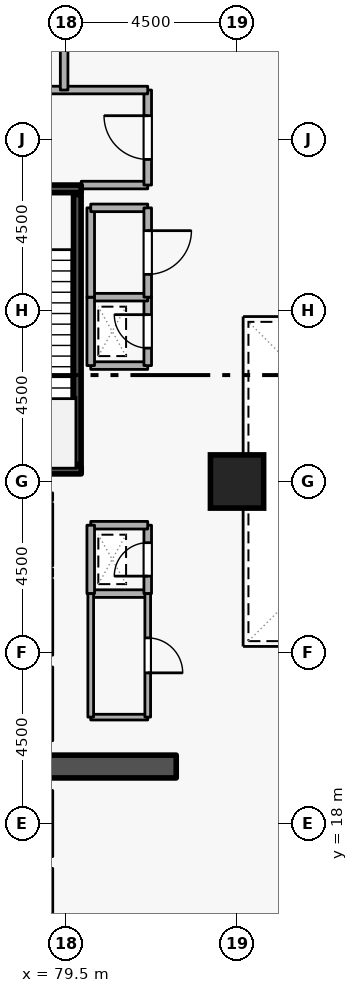
"""IFC4 building model, lengths in metres.
Left out: names, types, materials, properties, quantities, classifications, styles, units other than length and angle.
Written with IfcOpenShell. Run it as: python <this file> out.ifc"""

import sys

from ifc_helpers import new_model, si_unit, direction, frame, frame_2d, origin, origin_2d, place, context, subcontext, project, spatial, rectangle, extrude, element, fill, save


model = new_model("IFC4")
c1 = context("Model", 3, precision=1e-05, world=origin(), true_north=direction((0.0, 1.0)))
c2 = subcontext(c1, "Body", "Model", "MODEL_VIEW")
j1 = project(units=[si_unit("LENGTHUNIT", "METRE"), si_unit("PLANEANGLEUNIT", "RADIAN")], contexts=[c1])
p1 = place(None, origin())
s1 = spatial("IfcSite", under=j1, at=p1, CompositionType="ELEMENT")
p2 = place(p1, origin())
s2 = spatial("IfcBuilding", under=s1, at=p2, CompositionType="ELEMENT")
p3 = place(p2, origin())
s3 = spatial("IfcBuildingStorey", under=s2, at=p3, CompositionType="ELEMENT", Elevation=0.0)
p4 = place(p3, frame((76.7, 19.5, 0.0), z_axis=(0.0, 0.0, 1.0), x_axis=(1.0, 0.0, 0.0)))
e1 = element("IfcWall", 1, at=p4, inside=s3, PredefinedType="SHEAR", context=c2, shape_type="SweptSolid", body=[
    extrude(rectangle(XDim=5.7, YDim=0.6, at=frame_2d((2.85, 0.0))), origin(), (0.0, 0.0, 1.0), 4.8),
])
p5 = place(p3, frame((84.0, 27.0, 0.0), z_axis=(0.0, 0.0, 1.0), x_axis=(1.0, 0.0, 0.0)))
e2 = element("IfcColumn", 2, at=p5, inside=s3, PredefinedType="COLUMN", context=c2, shape_type="SweptSolid", body=[
    extrude(rectangle(XDim=1.4, YDim=1.4, at=origin_2d()), origin(), (0.0, 0.0, 1.0), 4.8),
])
p6 = place(p3, frame((79.05, 24.78, 0.0), z_axis=(0.0, 0.0, 1.0), x_axis=(0.0, 1.0, 0.0)))
e3 = element("IfcWall", 3, at=p6, inside=s3, PredefinedType="STANDARD", context=c2, shape_type="SweptSolid", body=[
    extrude(rectangle(XDim=1.64, YDim=0.2, at=frame_2d((0.82, 0.0))), origin(), (0.0, 0.0, 1.0), 4.46),
])
p7 = place(p6, frame((0.31, 0.0, 0.0)))
e4 = element("IfcOpeningElement", 4, at=p7, cuts=e3, PredefinedType="OPENING", context=c2, shape_type="SweptSolid", body=[
    extrude(rectangle(XDim=1.02, YDim=2.06, at=frame_2d((0.51, 1.03))), frame((0.0, 0.11, 0.0), z_axis=(0.0, -1.0, 0.0), x_axis=(1.0, 0.0, 0.0)), (0.0, 0.0, 1.0), 0.22),
])
p8 = place(p3, frame((79.05, 22.43, 0.0), z_axis=(0.0, 0.0, 1.0), x_axis=(0.0, 1.0, 0.0)))
e5 = element("IfcWall", 5, at=p8, inside=s3, PredefinedType="STANDARD", context=c2, shape_type="SweptSolid", body=[
    extrude(rectangle(XDim=1.99, YDim=0.2, at=frame_2d((0.995, 0.0))), origin(), (0.0, 0.0, 1.0), 4.46),
])
p9 = place(p8, frame((0.485, 0.0, 0.0)))
e6 = element("IfcOpeningElement", 6, at=p9, cuts=e5, PredefinedType="OPENING", context=c2, shape_type="SweptSolid", body=[
    extrude(rectangle(XDim=1.02, YDim=2.06, at=frame_2d((0.51, 1.03))), frame((0.0, 0.11, 0.0), z_axis=(0.0, -1.0, 0.0), x_axis=(1.0, 0.0, 0.0)), (0.0, 0.0, 1.0), 0.22),
])
p10 = place(p3, frame((79.05, 20.18, 0.0), z_axis=(0.0, 0.0, 1.0), x_axis=(0.0, 1.0, 0.0)))
e7 = element("IfcWall", 7, at=p10, inside=s3, PredefinedType="STANDARD", context=c2, shape_type="SweptSolid", body=[
    extrude(rectangle(XDim=1.94, YDim=0.2, at=frame_2d((0.97, 0.0))), origin(), (0.0, 0.0, 1.0), 4.46),
])
p11 = place(p10, frame((0.46, 0.0, 0.0)))
e8 = element("IfcOpeningElement", 8, at=p11, cuts=e7, PredefinedType="OPENING", context=c2, shape_type="SweptSolid", body=[
    extrude(rectangle(XDim=1.02, YDim=2.06, at=frame_2d((0.51, 1.03))), frame((0.0, 0.11, 0.0), z_axis=(0.0, -1.0, 0.0), x_axis=(1.0, 0.0, 0.0)), (0.0, 0.0, 1.0), 0.22),
])
p12 = place(p3, frame((79.05, 17.13, 0.0), z_axis=(0.0, 0.0, 1.0), x_axis=(0.0, 1.0, 0.0)))
e9 = element("IfcWall", 9, at=p12, inside=s3, PredefinedType="STANDARD", context=c2, shape_type="SweptSolid", body=[
    extrude(rectangle(XDim=1.74, YDim=0.2, at=frame_2d((0.87, 0.0))), origin(), (0.0, 0.0, 1.0), 4.46),
])
p13 = place(p12, frame((0.36, 0.0, 0.0)))
e10 = element("IfcOpeningElement", 10, at=p13, cuts=e9, PredefinedType="OPENING", context=c2, shape_type="SweptSolid", body=[
    extrude(rectangle(XDim=1.02, YDim=2.06, at=frame_2d((0.51, 1.03))), frame((0.0, 0.11, 0.0), z_axis=(0.0, -1.0, 0.0), x_axis=(1.0, 0.0, 0.0)), (0.0, 0.0, 1.0), 0.22),
])
p14 = place(p3, frame((79.05, 15.03, 0.0), z_axis=(0.0, 0.0, 1.0), x_axis=(0.0, 1.0, 0.0)))
e11 = element("IfcWall", 11, at=p14, inside=s3, PredefinedType="STANDARD", context=c2, shape_type="SweptSolid", body=[
    extrude(rectangle(XDim=1.79, YDim=0.2, at=frame_2d((0.895, 0.0))), origin(), (0.0, 0.0, 1.0), 4.46),
])
p15 = place(p14, frame((0.385, 0.0, 0.0)))
e12 = element("IfcOpeningElement", 12, at=p15, cuts=e11, PredefinedType="OPENING", context=c2, shape_type="SweptSolid", body=[
    extrude(rectangle(XDim=1.02, YDim=2.06, at=frame_2d((0.51, 1.03))), frame((0.0, 0.11, 0.0), z_axis=(0.0, -1.0, 0.0), x_axis=(1.0, 0.0, 0.0)), (0.0, 0.0, 1.0), 0.22),
])
p16 = place(p3, frame((76.55, 34.7, 0.0), z_axis=(0.0, 0.0, 1.0), x_axis=(1.0, 0.0, 0.0)))
e13 = element("IfcWall", 13, at=p16, inside=s3, PredefinedType="SHEAR", context=c2, shape_type="SweptSolid", body=[
    extrude(rectangle(XDim=3.35, YDim=0.2, at=frame_2d((1.675, 0.0))), origin(), (0.0, 0.0, 1.0), 4.8),
])
p17 = place(p16, frame((1.125, 0.0, 0.0)))
e14 = element("IfcOpeningElement", 14, at=p17, cuts=e13, PredefinedType="OPENING", context=c2, shape_type="SweptSolid", body=[
    extrude(rectangle(XDim=1.1, YDim=2.1, at=frame_2d((0.55, 1.05))), frame((0.0, 0.11, 0.0), z_axis=(0.0, -1.0, 0.0), x_axis=(1.0, 0.0, 0.0)), (0.0, 0.0, 1.0), 0.22),
])
p18 = place(p3, frame((79.9, 27.3, 0.0), z_axis=(0.0, 0.0, 1.0), x_axis=(-1.0, 0.0, 0.0)))
e15 = element("IfcWall", 15, at=p18, inside=s3, PredefinedType="SHEAR", context=c2, shape_type="SweptSolid", body=[
    extrude(rectangle(XDim=3.35, YDim=0.2, at=frame_2d((1.675, 0.0))), origin(), (0.0, 0.0, 1.0), 4.8),
])
p19 = place(p3, frame((79.797, 27.45, 0.0), z_axis=(0.0, 0.0, 1.0), x_axis=(0.0, 1.0, 0.0)))
e16 = element("IfcWall", 16, at=p19, inside=s3, PredefinedType="SHEAR", context=c2, shape_type="SweptSolid", body=[
    extrude(rectangle(XDim=7.1, YDim=0.2, at=frame_2d((3.55, 0.0))), origin(), (0.0, 0.0, 1.0), 4.8),
])
p20 = place(p3, frame((79.9, 34.8, 0.0), z_axis=(0.0, 0.0, 1.0), x_axis=(1.0, 0.0, 0.0)))
e17 = element("IfcWall", 17, at=p20, inside=s3, PredefinedType="STANDARD", context=c2, shape_type="SweptSolid", body=[
    extrude(rectangle(XDim=1.75, YDim=0.2, at=frame_2d((0.875, 0.0))), origin(), (0.0, 0.0, 1.0), 3.665),
])
p21 = place(p3, frame((81.65, 34.8, 0.0), z_axis=(0.0, 0.0, 1.0), x_axis=(0.0, 1.0, 0.0)))
e18 = element("IfcWall", 18, at=p21, inside=s3, PredefinedType="STANDARD", context=c2, shape_type="SweptSolid", body=[
    extrude(rectangle(XDim=2.5, YDim=0.2, at=frame_2d((1.25, 0.0))), origin(), (0.0, 0.0, 1.0), 4.46),
])
p22 = place(p21, frame((0.675, 0.0, 0.0)))
e19 = element("IfcOpeningElement", 19, at=p22, cuts=e18, PredefinedType="OPENING", context=c2, shape_type="SweptSolid", body=[
    extrude(rectangle(XDim=1.15, YDim=2.1, at=frame_2d((0.575, 1.05))), frame((0.0, 0.11, 0.0), z_axis=(0.0, -1.0, 0.0), x_axis=(1.0, 0.0, 0.0)), (0.0, 0.0, 1.0), 0.22),
])
p23 = place(p3, frame((81.65, 37.3, 0.0), z_axis=(0.0, 0.0, 1.0), x_axis=(-1.0, 0.0, 0.0)))
e20 = element("IfcWall", 20, at=p23, inside=s3, PredefinedType="STANDARD", context=c2, shape_type="SweptSolid", body=[
    extrude(rectangle(XDim=5.15, YDim=0.2, at=frame_2d((2.575, 0.0))), origin(), (0.0, 0.0, 1.0), 4.46),
])
p24 = place(p23, frame((2.75, 0.0, 0.0)))
e21 = element("IfcOpeningElement", 21, at=p24, cuts=e20, PredefinedType="OPENING", context=c2, shape_type="SweptSolid", body=[
    extrude(rectangle(XDim=1.15, YDim=2.1, at=frame_2d((0.575, 1.05))), frame((0.0, 0.11, 0.0), z_axis=(0.0, -1.0, 0.0), x_axis=(1.0, 0.0, 0.0)), (0.0, 0.0, 1.0), 0.22),
])
p25 = place(p3, frame((80.15, 24.05, 0.0), z_axis=(0.0, 0.0, 1.0), x_axis=(1.0, 0.0, 0.0)))
e22 = element("IfcWall", 22, at=p25, inside=s3, PredefinedType="STANDARD", context=c2, shape_type="SweptSolid", body=[
    extrude(rectangle(XDim=1.5, YDim=0.2, at=frame_2d((0.75, 0.0))), origin(), (0.0, 0.0, 1.0), 4.46),
])
p26 = place(p3, frame((81.65, 24.05, 0.0), z_axis=(0.0, 0.0, 1.0), x_axis=(0.0, 1.0, 0.0)))
e23 = element("IfcWall", 23, at=p26, inside=s3, PredefinedType="STANDARD", context=c2, shape_type="SweptSolid", body=[
    extrude(rectangle(XDim=1.8, YDim=0.2, at=frame_2d((0.9, 0.0))), origin(), (0.0, 0.0, 1.0), 4.46),
])
p27 = place(p26, frame((0.46, 0.0, 0.0)))
e24 = element("IfcOpeningElement", 24, at=p27, cuts=e23, PredefinedType="OPENING", context=c2, shape_type="SweptSolid", body=[
    extrude(rectangle(XDim=0.88, YDim=2.04, at=frame_2d((0.44, 1.02))), frame((0.0, 0.11, 0.0), z_axis=(0.0, -1.0, 0.0), x_axis=(1.0, 0.0, 0.0)), (0.0, 0.0, 1.0), 0.22),
])
p28 = place(p3, frame((81.65, 25.85, 0.0), z_axis=(0.0, 0.0, 1.0), x_axis=(-1.0, 0.0, 0.0)))
e25 = element("IfcWall", 25, at=p28, inside=s3, PredefinedType="STANDARD", context=c2, shape_type="SweptSolid", body=[
    extrude(rectangle(XDim=1.5, YDim=0.2, at=frame_2d((0.75, 0.0))), origin(), (0.0, 0.0, 1.0), 4.46),
])
p29 = place(p3, frame((80.15, 25.85, 0.0), z_axis=(0.0, 0.0, 1.0), x_axis=(0.0, -1.0, 0.0)))
e26 = element("IfcWall", 26, at=p29, inside=s3, PredefinedType="STANDARD", context=c2, shape_type="SweptSolid", body=[
    extrude(rectangle(XDim=1.8, YDim=0.2, at=frame_2d((0.9, 0.0))), origin(), (0.0, 0.0, 1.0), 4.46),
])
p30 = place(p3, frame((80.15, 30.05, 0.0), z_axis=(0.0, 0.0, 1.0), x_axis=(1.0, 0.0, 0.0)))
e27 = element("IfcWall", 27, at=p30, inside=s3, PredefinedType="STANDARD", context=c2, shape_type="SweptSolid", body=[
    extrude(rectangle(XDim=1.5, YDim=0.2, at=frame_2d((0.75, 0.0))), origin(), (0.0, 0.0, 1.0), 4.46),
])
p31 = place(p3, frame((81.65, 30.05, 0.0), z_axis=(0.0, 0.0, 1.0), x_axis=(0.0, 1.0, 0.0)))
e28 = element("IfcWall", 28, at=p31, inside=s3, PredefinedType="STANDARD", context=c2, shape_type="SweptSolid", body=[
    extrude(rectangle(XDim=1.8, YDim=0.2, at=frame_2d((0.9, 0.0))), origin(), (0.0, 0.0, 1.0), 4.46),
])
p32 = place(p31, frame((0.46, 0.0, 0.0)))
e29 = element("IfcOpeningElement", 29, at=p32, cuts=e28, PredefinedType="OPENING", context=c2, shape_type="SweptSolid", body=[
    extrude(rectangle(XDim=0.88, YDim=2.04, at=frame_2d((0.44, 1.02))), frame((0.0, 0.11, 0.0), z_axis=(0.0, -1.0, 0.0), x_axis=(1.0, 0.0, 0.0)), (0.0, 0.0, 1.0), 0.22),
])
p33 = place(p3, frame((81.65, 31.85, 0.0), z_axis=(0.0, 0.0, 1.0), x_axis=(-1.0, 0.0, 0.0)))
e30 = element("IfcWall", 30, at=p33, inside=s3, PredefinedType="STANDARD", context=c2, shape_type="SweptSolid", body=[
    extrude(rectangle(XDim=1.5, YDim=0.2, at=frame_2d((0.75, 0.0))), origin(), (0.0, 0.0, 1.0), 4.46),
])
p34 = place(p3, frame((80.15, 31.85, 0.0), z_axis=(0.0, 0.0, 1.0), x_axis=(0.0, -1.0, 0.0)))
e31 = element("IfcWall", 31, at=p34, inside=s3, PredefinedType="STANDARD", context=c2, shape_type="SweptSolid", body=[
    extrude(rectangle(XDim=1.8, YDim=0.2, at=frame_2d((0.9, 0.0))), origin(), (0.0, 0.0, 1.0), 4.46),
])
p35 = place(p3, frame((80.15, 31.85, 0.0), z_axis=(0.0, 0.0, 1.0), x_axis=(0.0, 1.0, 0.0)))
e32 = element("IfcWall", 32, at=p35, inside=s3, PredefinedType="STANDARD", context=c2, shape_type="SweptSolid", body=[
    extrude(rectangle(XDim=2.35, YDim=0.2, at=frame_2d((1.175, 0.0))), origin(), (0.0, 0.0, 1.0), 4.46),
])
p36 = place(p3, frame((80.15, 34.2, 0.0), z_axis=(0.0, 0.0, 1.0), x_axis=(1.0, 0.0, 0.0)))
e33 = element("IfcWall", 33, at=p36, inside=s3, PredefinedType="STANDARD", context=c2, shape_type="SweptSolid", body=[
    extrude(rectangle(XDim=1.5, YDim=0.2, at=frame_2d((0.75, 0.0))), origin(), (0.0, 0.0, 1.0), 3.665),
])
p37 = place(p3, frame((81.65, 34.2, 0.0), z_axis=(0.0, 0.0, 1.0), x_axis=(0.0, -1.0, 0.0)))
e34 = element("IfcWall", 34, at=p37, inside=s3, PredefinedType="STANDARD", context=c2, shape_type="SweptSolid", body=[
    extrude(rectangle(XDim=2.35, YDim=0.2, at=frame_2d((1.175, 0.0))), origin(), (0.0, 0.0, 1.0), 4.46),
])
p38 = place(p37, frame((0.6, 0.0, 0.0)))
e35 = element("IfcOpeningElement", 35, at=p38, cuts=e34, PredefinedType="OPENING", context=c2, shape_type="SweptSolid", body=[
    extrude(rectangle(XDim=1.15, YDim=2.1, at=frame_2d((0.575, 1.05))), frame((0.0, 0.11, 0.0), z_axis=(0.0, -1.0, 0.0), x_axis=(1.0, 0.0, 0.0)), (0.0, 0.0, 1.0), 0.22),
])
p39 = place(p3, frame((79.45, 49.18, 0.0), z_axis=(0.0, 0.0, 1.0), x_axis=(0.0, -1.0, 0.0)))
e36 = element("IfcWall", 36, at=p39, inside=s3, PredefinedType="STANDARD", context=c2, shape_type="SweptSolid", body=[
    extrude(rectangle(XDim=11.88, YDim=0.2, at=frame_2d((5.94, 0.0))), origin(), (0.0, 0.0, 1.0), 4.46),
])
p40 = place(p3, frame((81.65, 20.8, 0.0), z_axis=(0.0, 0.0, 1.0), x_axis=(-1.0, 0.0, 0.0)))
e37 = element("IfcWall", 37, at=p40, inside=s3, PredefinedType="PARTITIONING", context=c2, shape_type="SweptSolid", body=[
    extrude(rectangle(XDim=1.5, YDim=0.15, at=frame_2d((0.75, 0.0))), origin(), (0.0, 0.0, 1.0), 4.46),
])
p41 = place(p3, frame((80.15, 20.8, 0.0), z_axis=(0.0, 0.0, 1.0), x_axis=(0.0, 1.0, 0.0)))
e38 = element("IfcWall", 38, at=p41, inside=s3, PredefinedType="PARTITIONING", context=c2, shape_type="SweptSolid", body=[
    extrude(rectangle(XDim=3.25, YDim=0.15, at=frame_2d((1.625, 0.0))), origin(), (0.0, 0.0, 1.0), 4.46),
])
p42 = place(p3, frame((81.65, 24.05, 0.0), z_axis=(0.0, 0.0, 1.0), x_axis=(0.0, -1.0, 0.0)))
e39 = element("IfcWall", 39, at=p42, inside=s3, PredefinedType="PARTITIONING", context=c2, shape_type="SweptSolid", body=[
    extrude(rectangle(XDim=3.25, YDim=0.15, at=frame_2d((1.625, 0.0))), origin(), (0.0, 0.0, 1.0), 4.46),
])
p43 = place(p42, frame((1.165, 0.0, 0.0)))
e40 = element("IfcOpeningElement", 40, at=p43, cuts=e39, PredefinedType="OPENING", context=c2, shape_type="SweptSolid", body=[
    extrude(rectangle(XDim=0.92, YDim=2.08, at=frame_2d((0.46, 1.04))), frame((0.0, 0.085, 0.0), z_axis=(0.0, -1.0, 0.0), x_axis=(1.0, 0.0, 0.0)), (0.0, 0.0, 1.0), 0.17),
])
p44 = place(p22, origin())
e41 = element("IfcDoor", 41, at=p44, inside=s3, OperationType="SINGLE_SWING_RIGHT", PredefinedType="DOOR", context=c2, shape_type="SweptSolid", body=[
    extrude(rectangle(XDim=1.15, YDim=2.1, at=frame_2d((0.575, 1.05))), frame((0.0, 0.025, 0.0), z_axis=(0.0, -1.0, 0.0), x_axis=(1.0, 0.0, 0.0)), (0.0, 0.0, 1.0), 0.05),
])
fill(e19, e41)
p45 = place(p27, origin())
e42 = element("IfcDoor", 42, at=p45, inside=s3, OperationType="SINGLE_SWING_LEFT", PredefinedType="DOOR", context=c2, shape_type="SweptSolid", body=[
    extrude(rectangle(XDim=0.88, YDim=2.04, at=frame_2d((0.44, 1.02))), frame((0.0, 0.025, 0.0), z_axis=(0.0, -1.0, 0.0), x_axis=(1.0, 0.0, 0.0)), (0.0, 0.0, 1.0), 0.05),
])
fill(e24, e42)
p46 = place(p32, origin())
e43 = element("IfcDoor", 43, at=p46, inside=s3, OperationType="SINGLE_SWING_RIGHT", PredefinedType="DOOR", context=c2, shape_type="SweptSolid", body=[
    extrude(rectangle(XDim=0.88, YDim=2.04, at=frame_2d((0.44, 1.02))), frame((0.0, 0.025, 0.0), z_axis=(0.0, -1.0, 0.0), x_axis=(1.0, 0.0, 0.0)), (0.0, 0.0, 1.0), 0.05),
])
fill(e29, e43)
p47 = place(p43, origin())
e44 = element("IfcDoor", 44, at=p47, inside=s3, OperationType="SINGLE_SWING_RIGHT", PredefinedType="DOOR", context=c2, shape_type="SweptSolid", body=[
    extrude(rectangle(XDim=0.92, YDim=2.08, at=frame_2d((0.46, 1.04))), frame((0.0, 0.025, 0.0), z_axis=(0.0, -1.0, 0.0), x_axis=(1.0, 0.0, 0.0)), (0.0, 0.0, 1.0), 0.05),
])
fill(e40, e44)
p48 = place(p38, origin())
e45 = element("IfcDoor", 45, at=p48, inside=s3, OperationType="SINGLE_SWING_LEFT", PredefinedType="DOOR", context=c2, shape_type="SweptSolid", body=[
    extrude(rectangle(XDim=1.15, YDim=2.1, at=frame_2d((0.575, 1.05))), frame((0.0, 0.025, 0.0), z_axis=(0.0, -1.0, 0.0), x_axis=(1.0, 0.0, 0.0)), (0.0, 0.0, 1.0), 0.05),
])
fill(e35, e45)
save(model, sys.argv[1])
